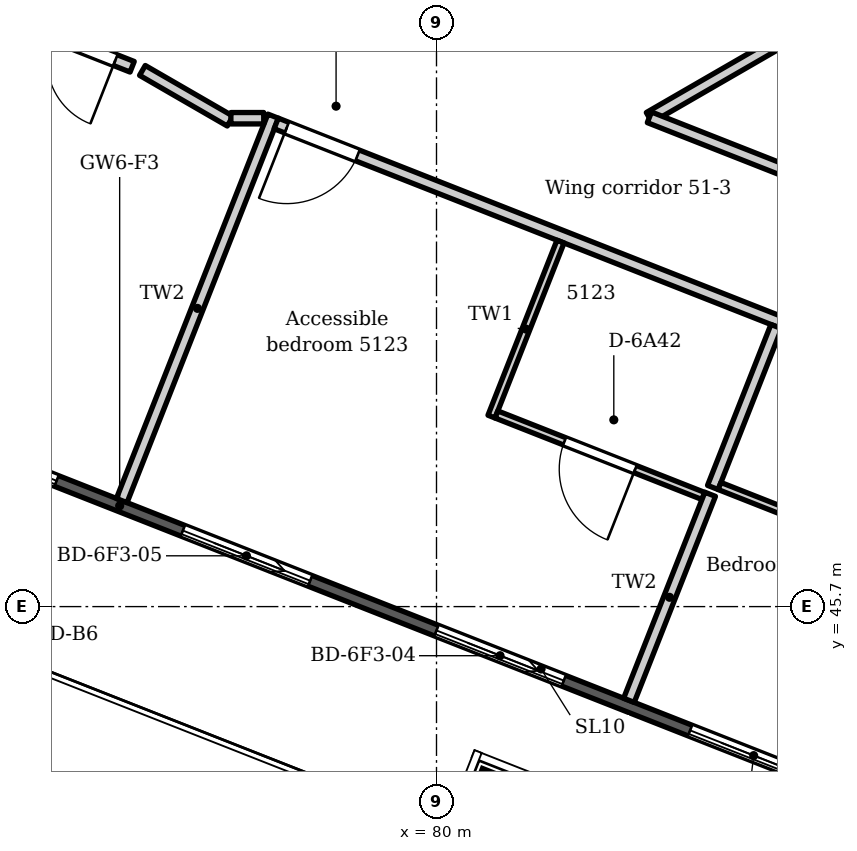
"""IFC4 building model, lengths in metres.
Left out: names, types, materials, properties, quantities, classifications, styles, units other than length and angle.
Written with IfcOpenShell. Run it as: python <this file> out.ifc"""

import sys

from ifc_helpers import new_model, si_unit, direction, frame, frame_2d, origin, origin_2d, place, context, subcontext, project, spatial, polyline, rectangle, outline, extrude, element, fill, save


model = new_model("IFC4")
c1 = context("Model", 3, precision=1e-05, world=origin(), true_north=direction((0.0, 1.0)))
c2 = subcontext(c1, "Body", "Model", "MODEL_VIEW")
j1 = project(units=[si_unit("LENGTHUNIT", "METRE"), si_unit("PLANEANGLEUNIT", "RADIAN")], contexts=[c1])
p1 = place(None, origin())
s1 = spatial("IfcSite", under=j1, at=p1, CompositionType="ELEMENT")
p2 = place(p1, origin())
s2 = spatial("IfcBuilding", under=s1, at=p2, CompositionType="ELEMENT")
p3 = place(p2, frame((0.0, 0.0, 198.0)))
s3 = spatial("IfcBuildingStorey", under=s2, at=p3, CompositionType="ELEMENT", Elevation=198.0)
p4 = place(p3, frame((80.821, 43.163, -0.35), z_axis=(0.0, 0.0, 1.0), x_axis=(-0.930417567982, 0.366501226724, 0.0)))
e1 = element("IfcColumn", 1, at=p4, inside=s3, PredefinedType="COLUMN", context=c2, shape_type="SweptSolid", body=[
    extrude(rectangle(XDim=0.7, YDim=0.6, at=origin_2d()), origin(), (0.0, 0.0, 1.0), 3.95),
])
p5 = place(p3, frame((92.514, 40.454, 0.0), z_axis=(0.0, 0.0, 1.0), x_axis=(-0.930417922313, 0.3665003272, 0.0)))
e2 = element("IfcWall", 2, at=p5, inside=s3, PredefinedType="SOLIDWALL", context=c2, shape_type="SweptSolid", body=[
    extrude(outline(polyline([(0.149, 0.075), (0.149, -0.075), (39.297, -0.075), (39.297, 0.075), (0.149, 0.075)])), origin(), (0.0, 0.0, 1.0), 3.3),
])
p6 = place(p5, frame((1.193, 0.0, 0.0)))
e3 = element("IfcOpeningElement", 3, at=p6, cuts=e2, PredefinedType="OPENING", context=c2, shape_type="SweptSolid", body=[
    extrude(rectangle(XDim=1.8, YDim=2.6, at=frame_2d((0.9, 1.3))), frame((0.0, 0.085, 0.0), z_axis=(0.0, -1.0, 0.0), x_axis=(1.0, 0.0, 0.0)), (0.0, 0.0, 1.0), 0.17),
])
p7 = place(p5, frame((4.479, 0.0, 0.0)))
e4 = element("IfcOpeningElement", 4, at=p7, cuts=e2, PredefinedType="OPENING", context=c2, shape_type="SweptSolid", body=[
    extrude(rectangle(XDim=1.8, YDim=2.6, at=frame_2d((0.9, 1.3))), frame((0.0, 0.085, 0.0), z_axis=(0.0, -1.0, 0.0), x_axis=(1.0, 0.0, 0.0)), (0.0, 0.0, 1.0), 0.17),
])
p8 = place(p5, frame((8.065, 0.0, 0.0)))
e5 = element("IfcOpeningElement", 5, at=p8, cuts=e2, PredefinedType="OPENING", context=c2, shape_type="SweptSolid", body=[
    extrude(rectangle(XDim=1.8, YDim=2.6, at=frame_2d((0.9, 1.3))), frame((0.0, 0.085, 0.0), z_axis=(0.0, -1.0, 0.0), x_axis=(1.0, 0.0, 0.0)), (0.0, 0.0, 1.0), 0.17),
])
p9 = place(p5, frame((11.651, 0.0, 0.0)))
e6 = element("IfcOpeningElement", 6, at=p9, cuts=e2, PredefinedType="OPENING", context=c2, shape_type="SweptSolid", body=[
    extrude(rectangle(XDim=1.8, YDim=2.6, at=frame_2d((0.9, 1.3))), frame((0.0, 0.085, 0.0), z_axis=(0.0, -1.0, 0.0), x_axis=(1.0, 0.0, 0.0)), (0.0, 0.0, 1.0), 0.17),
])
p10 = place(p5, frame((15.237, 0.0, 0.0)))
e7 = element("IfcOpeningElement", 7, at=p10, cuts=e2, PredefinedType="OPENING", context=c2, shape_type="SweptSolid", body=[
    extrude(rectangle(XDim=1.8, YDim=2.6, at=frame_2d((0.9, 1.3))), frame((0.0, 0.085, 0.0), z_axis=(0.0, -1.0, 0.0), x_axis=(1.0, 0.0, 0.0)), (0.0, 0.0, 1.0), 0.17),
])
p11 = place(p5, frame((18.823, 0.0, 0.0)))
e8 = element("IfcOpeningElement", 8, at=p11, cuts=e2, PredefinedType="OPENING", context=c2, shape_type="SweptSolid", body=[
    extrude(rectangle(XDim=1.8, YDim=2.6, at=frame_2d((0.9, 1.3))), frame((0.0, 0.085, 0.0), z_axis=(0.0, -1.0, 0.0), x_axis=(1.0, 0.0, 0.0)), (0.0, 0.0, 1.0), 0.17),
])
p12 = place(p5, frame((22.409, 0.0, 0.0)))
e9 = element("IfcOpeningElement", 9, at=p12, cuts=e2, PredefinedType="OPENING", context=c2, shape_type="SweptSolid", body=[
    extrude(rectangle(XDim=1.8, YDim=2.6, at=frame_2d((0.9, 1.3))), frame((0.0, 0.085, 0.0), z_axis=(0.0, -1.0, 0.0), x_axis=(1.0, 0.0, 0.0)), (0.0, 0.0, 1.0), 0.17),
])
p13 = place(p5, frame((25.995, 0.0, 0.0)))
e10 = element("IfcOpeningElement", 10, at=p13, cuts=e2, PredefinedType="OPENING", context=c2, shape_type="SweptSolid", body=[
    extrude(rectangle(XDim=1.8, YDim=2.6, at=frame_2d((0.9, 1.3))), frame((0.0, 0.085, 0.0), z_axis=(0.0, -1.0, 0.0), x_axis=(1.0, 0.0, 0.0)), (0.0, 0.0, 1.0), 0.17),
])
p14 = place(p5, frame((29.581, 0.0, 0.0)))
e11 = element("IfcOpeningElement", 11, at=p14, cuts=e2, PredefinedType="OPENING", context=c2, shape_type="SweptSolid", body=[
    extrude(rectangle(XDim=1.8, YDim=2.6, at=frame_2d((0.9, 1.3))), frame((0.0, 0.085, 0.0), z_axis=(0.0, -1.0, 0.0), x_axis=(1.0, 0.0, 0.0)), (0.0, 0.0, 1.0), 0.17),
])
p15 = place(p5, frame((33.167, 0.0, 0.0)))
e12 = element("IfcOpeningElement", 12, at=p15, cuts=e2, PredefinedType="OPENING", context=c2, shape_type="SweptSolid", body=[
    extrude(rectangle(XDim=1.8, YDim=2.6, at=frame_2d((0.9, 1.3))), frame((0.0, 0.085, 0.0), z_axis=(0.0, -1.0, 0.0), x_axis=(1.0, 0.0, 0.0)), (0.0, 0.0, 1.0), 0.17),
])
p16 = place(p5, frame((36.453, 0.0, 0.0)))
e13 = element("IfcOpeningElement", 13, at=p16, cuts=e2, PredefinedType="OPENING", context=c2, shape_type="SweptSolid", body=[
    extrude(rectangle(XDim=1.8, YDim=2.6, at=frame_2d((0.9, 1.3))), frame((0.0, 0.085, 0.0), z_axis=(0.0, -1.0, 0.0), x_axis=(1.0, 0.0, 0.0)), (0.0, 0.0, 1.0), 0.17),
])
p17 = place(p3, origin())
e14 = element("IfcWall", 14, at=p17, inside=s3, PredefinedType="PARAPET", context=c2, shape_type="SweptSolid", body=[
    extrude(outline(polyline([(64.54, 48.931), (93.272, 32.007), (93.275, 32.354), (66.324, 48.229), (64.54, 48.931)])), origin(), (0.0, 0.0, 1.0), 1.1),
])
p18 = place(p3, frame((73.101, 53.942, 0.0), z_axis=(0.0, 0.0, 1.0), x_axis=(0.930438385979, -0.366448372758, 0.0)))
e15 = element("IfcWall", 15, at=p18, inside=s3, PredefinedType="PARTITIONING", context=c2, shape_type="SweptSolid", body=[
    extrude(rectangle(XDim=3.112, YDim=0.15, at=frame_2d((1.556, 0.0))), origin(), (0.0, 0.0, 1.0), 3.3),
])
p19 = place(p18, frame((1.975, 0.0, 0.0)))
e16 = element("IfcOpeningElement", 16, at=p19, cuts=e15, PredefinedType="OPENING", context=c2, shape_type="SweptSolid", body=[
    extrude(rectangle(XDim=0.9, YDim=2.1, at=frame_2d((0.45, 1.05))), frame((0.0, 0.085, 0.0), z_axis=(0.0, -1.0, 0.0), x_axis=(1.0, 0.0, 0.0)), (0.0, 0.0, 1.0), 0.17),
])
p20 = place(p3, frame((75.859, 47.095, 0.0), z_axis=(0.0, 0.0, 1.0), x_axis=(0.366669445619, 0.93035128723, 0.0)))
e17 = element("IfcWall", 17, at=p20, inside=s3, PredefinedType="PARTITIONING", context=c2, shape_type="SweptSolid", body=[
    extrude(rectangle(XDim=5.435, YDim=0.15, at=frame_2d((2.718, 0.0))), origin(), (0.0, 0.0, 1.0), 3.3),
])
p21 = place(p3, frame((76.131, 52.754, 0.0), z_axis=(0.0, 0.0, 1.0), x_axis=(0.865910926182, -0.500198228624, 0.0)))
e18 = element("IfcWall", 18, at=p21, inside=s3, PredefinedType="PARTITIONING", context=c2, shape_type="SweptSolid", body=[
    extrude(rectangle(XDim=1.333, YDim=0.15, at=frame_2d((0.666, 0.0))), origin(), (0.0, 0.0, 1.0), 3.3),
])
p22 = place(p3, frame((77.295, 52.125, 0.0), z_axis=(0.0, 0.0, 1.0), x_axis=(1.0, 0.0, 0.0)))
e19 = element("IfcWall", 19, at=p22, inside=s3, PredefinedType="PARTITIONING", context=c2, shape_type="SweptSolid", body=[
    extrude(rectangle(XDim=0.432, YDim=0.15, at=frame_2d((0.216, 0.0))), origin(), (0.0, 0.0, 1.0), 3.3),
])
p23 = place(p3, frame((77.891, 52.056, 0.0), z_axis=(0.0, 0.0, 1.0), x_axis=(0.930403660154, -0.366536531837, 0.0)))
e20 = element("IfcWall", 20, at=p23, inside=s3, PredefinedType="PARTITIONING", context=c2, shape_type="SweptSolid", body=[
    extrude(rectangle(XDim=9.062, YDim=0.15, at=frame_2d((4.531, 0.0))), origin(), (0.0, 0.0, 1.0), 3.3),
])
p24 = place(p23, frame((0.15, 0.0, 0.0)))
e21 = element("IfcOpeningElement", 21, at=p24, cuts=e20, PredefinedType="OPENING", context=c2, shape_type="SweptSolid", body=[
    extrude(rectangle(XDim=1.0, YDim=2.1, at=frame_2d((0.5, 1.05))), frame((0.0, 0.085, 0.0), z_axis=(0.0, -1.0, 0.0), x_axis=(1.0, 0.0, 0.0)), (0.0, 0.0, 1.0), 0.17),
])
p25 = place(p3, frame((80.724, 48.199, 0.0), z_axis=(0.0, 0.0, 1.0), x_axis=(0.366811693538, 0.930295212007, 0.0)))
e22 = element("IfcWall", 22, at=p25, inside=s3, PredefinedType="PARTITIONING", context=c2, shape_type="SweptSolid", body=[
    extrude(rectangle(XDim=2.475, YDim=0.1, at=frame_2d((1.238, 0.0))), origin(), (0.0, 0.0, 1.0), 3.3),
])
p26 = place(p3, frame((80.789, 48.228, 0.0), z_axis=(0.0, 0.0, 1.0), x_axis=(0.930398043032, -0.366550789827, 0.0)))
e23 = element("IfcWall", 23, at=p26, inside=s3, PredefinedType="PARTITIONING", context=c2, shape_type="SweptSolid", body=[
    extrude(rectangle(XDim=2.925, YDim=0.1, at=frame_2d((1.463, 0.0))), origin(), (0.0, 0.0, 1.0), 3.3),
])
p27 = place(p26, frame((0.963, 0.0, 0.0)))
e24 = element("IfcOpeningElement", 24, at=p27, cuts=e23, PredefinedType="OPENING", context=c2, shape_type="SweptSolid", body=[
    extrude(rectangle(XDim=1.0, YDim=2.1, at=frame_2d((0.5, 1.05))), frame((0.0, 0.06, 0.0), z_axis=(0.0, -1.0, 0.0), x_axis=(1.0, 0.0, 0.0)), (0.0, 0.0, 1.0), 0.12),
])
p28 = place(p3, frame((82.532, 44.467, 0.0), z_axis=(0.0, 0.0, 1.0), x_axis=(0.366805887966, 0.9302975011, 0.0)))
e25 = element("IfcWall", 25, at=p28, inside=s3, PredefinedType="PARTITIONING", context=c2, shape_type="SweptSolid", body=[
    extrude(rectangle(XDim=2.913, YDim=0.15, at=frame_2d((1.457, 0.0))), origin(), (0.0, 0.0, 1.0), 3.3),
])
p29 = place(p3, frame((82.798, 52.135, 0.0), z_axis=(0.0, 0.0, 1.0), x_axis=(0.865994393525, 0.500053707499, 0.0)))
e26 = element("IfcWall", 26, at=p29, inside=s3, PredefinedType="PARTITIONING", context=c2, shape_type="SweptSolid", body=[
    extrude(rectangle(XDim=5.614, YDim=0.15, at=frame_2d((2.807, 0.0))), origin(), (0.0, 0.0, 1.0), 2.8),
])
p30 = place(p29, frame((2.322, 0.0, 0.0)))
e27 = element("IfcOpeningElement", 27, at=p30, cuts=e26, PredefinedType="OPENING", context=c2, shape_type="SweptSolid", body=[
    extrude(rectangle(XDim=0.9, YDim=2.1, at=frame_2d((0.45, 1.05))), frame((0.0, 0.085, 0.0), z_axis=(0.0, -1.0, 0.0), x_axis=(1.0, 0.0, 0.0)), (0.0, 0.0, 1.0), 0.17),
])
p31 = place(p3, frame((82.801, 52.137, 0.0), z_axis=(0.0, 0.0, 1.0), x_axis=(0.930387129981, -0.366578488685, 0.0)))
e28 = element("IfcWall", 28, at=p31, inside=s3, PredefinedType="PARTITIONING", context=c2, shape_type="SweptSolid", body=[
    extrude(rectangle(XDim=3.441, YDim=0.15, at=frame_2d((1.721, 0.0))), origin(), (0.0, 0.0, 1.0), 3.3),
])
p32 = place(p3, frame((83.636, 47.268, 0.0), z_axis=(0.0, 0.0, 1.0), x_axis=(0.366482291334, 0.930425026608, 0.0)))
e29 = element("IfcWall", 29, at=p32, inside=s3, PredefinedType="PARTITIONING", context=c2, shape_type="SweptSolid", body=[
    extrude(rectangle(XDim=2.275, YDim=0.15, at=frame_2d((1.137, 0.0))), origin(), (0.0, 0.0, 1.0), 3.3),
])
p33 = place(p3, frame((83.724, 47.287, 0.0), z_axis=(0.0, 0.0, 1.0), x_axis=(0.930328407888, -0.36672749212, 0.0)))
e30 = element("IfcWall", 30, at=p33, inside=s3, PredefinedType="PARTITIONING", context=c2, shape_type="SweptSolid", body=[
    extrude(rectangle(XDim=1.925, YDim=0.1, at=frame_2d((0.962, 0.0))), origin(), (0.0, 0.0, 1.0), 3.3),
])
p34 = place(p8, origin())
e31 = element("IfcDoor", 31, at=p34, inside=s3, OperationType="SLIDING_TO_LEFT", PredefinedType="DOOR", context=c2, shape_type="SweptSolid", body=[
    extrude(rectangle(XDim=1.8, YDim=2.6, at=frame_2d((0.9, 1.3))), frame((0.0, 0.025, 0.0), z_axis=(0.0, -1.0, 0.0), x_axis=(1.0, 0.0, 0.0)), (0.0, 0.0, 1.0), 0.05),
])
fill(e5, e31)
p35 = place(p9, origin())
e32 = element("IfcDoor", 32, at=p35, inside=s3, OperationType="SLIDING_TO_LEFT", PredefinedType="DOOR", context=c2, shape_type="SweptSolid", body=[
    extrude(rectangle(XDim=1.8, YDim=2.6, at=frame_2d((0.9, 1.3))), frame((0.0, 0.025, 0.0), z_axis=(0.0, -1.0, 0.0), x_axis=(1.0, 0.0, 0.0)), (0.0, 0.0, 1.0), 0.05),
])
fill(e6, e32)
p36 = place(p10, origin())
e33 = element("IfcDoor", 33, at=p36, inside=s3, OperationType="SLIDING_TO_LEFT", PredefinedType="DOOR", context=c2, shape_type="SweptSolid", body=[
    extrude(rectangle(XDim=1.8, YDim=2.6, at=frame_2d((0.9, 1.3))), frame((0.0, 0.025, 0.0), z_axis=(0.0, -1.0, 0.0), x_axis=(1.0, 0.0, 0.0)), (0.0, 0.0, 1.0), 0.05),
])
fill(e7, e33)
p37 = place(p11, origin())
e34 = element("IfcDoor", 34, at=p37, inside=s3, OperationType="SLIDING_TO_LEFT", PredefinedType="DOOR", context=c2, shape_type="SweptSolid", body=[
    extrude(rectangle(XDim=1.8, YDim=2.6, at=frame_2d((0.9, 1.3))), frame((0.0, 0.025, 0.0), z_axis=(0.0, -1.0, 0.0), x_axis=(1.0, 0.0, 0.0)), (0.0, 0.0, 1.0), 0.05),
])
fill(e8, e34)
p38 = place(p24, frame((1.0, 0.0, 0.0), z_axis=(0.0, 0.0, 1.0), x_axis=(-1.0, 0.0, 0.0)))
e35 = element("IfcDoor", 35, at=p38, inside=s3, OperationType="SINGLE_SWING_RIGHT", PredefinedType="DOOR", context=c2, shape_type="SweptSolid", body=[
    extrude(rectangle(XDim=1.0, YDim=2.1, at=frame_2d((0.5, 1.05))), frame((0.0, 0.025, 0.0), z_axis=(0.0, -1.0, 0.0), x_axis=(1.0, 0.0, 0.0)), (0.0, 0.0, 1.0), 0.05),
])
fill(e21, e35)
p39 = place(p19, frame((0.9, 0.0, 0.0), z_axis=(0.0, 0.0, 1.0), x_axis=(-1.0, 0.0, 0.0)))
e36 = element("IfcDoor", 36, at=p39, inside=s3, OperationType="SINGLE_SWING_LEFT", PredefinedType="DOOR", context=c2, shape_type="SweptSolid", body=[
    extrude(rectangle(XDim=0.9, YDim=2.1, at=frame_2d((0.45, 1.05))), frame((0.0, 0.025, 0.0), z_axis=(0.0, -1.0, 0.0), x_axis=(1.0, 0.0, 0.0)), (0.0, 0.0, 1.0), 0.05),
])
fill(e16, e36)
p40 = place(p27, frame((1.0, 0.0, 0.0), z_axis=(0.0, 0.0, 1.0), x_axis=(-1.0, 0.0, 0.0)))
e37 = element("IfcDoor", 37, at=p40, inside=s3, OperationType="SINGLE_SWING_LEFT", PredefinedType="DOOR", context=c2, shape_type="SweptSolid", body=[
    extrude(rectangle(XDim=1.0, YDim=2.1, at=frame_2d((0.5, 1.05))), frame((0.0, 0.025, 0.0), z_axis=(0.0, -1.0, 0.0), x_axis=(1.0, 0.0, 0.0)), (0.0, 0.0, 1.0), 0.05),
])
fill(e24, e37)
save(model, sys.argv[1])
